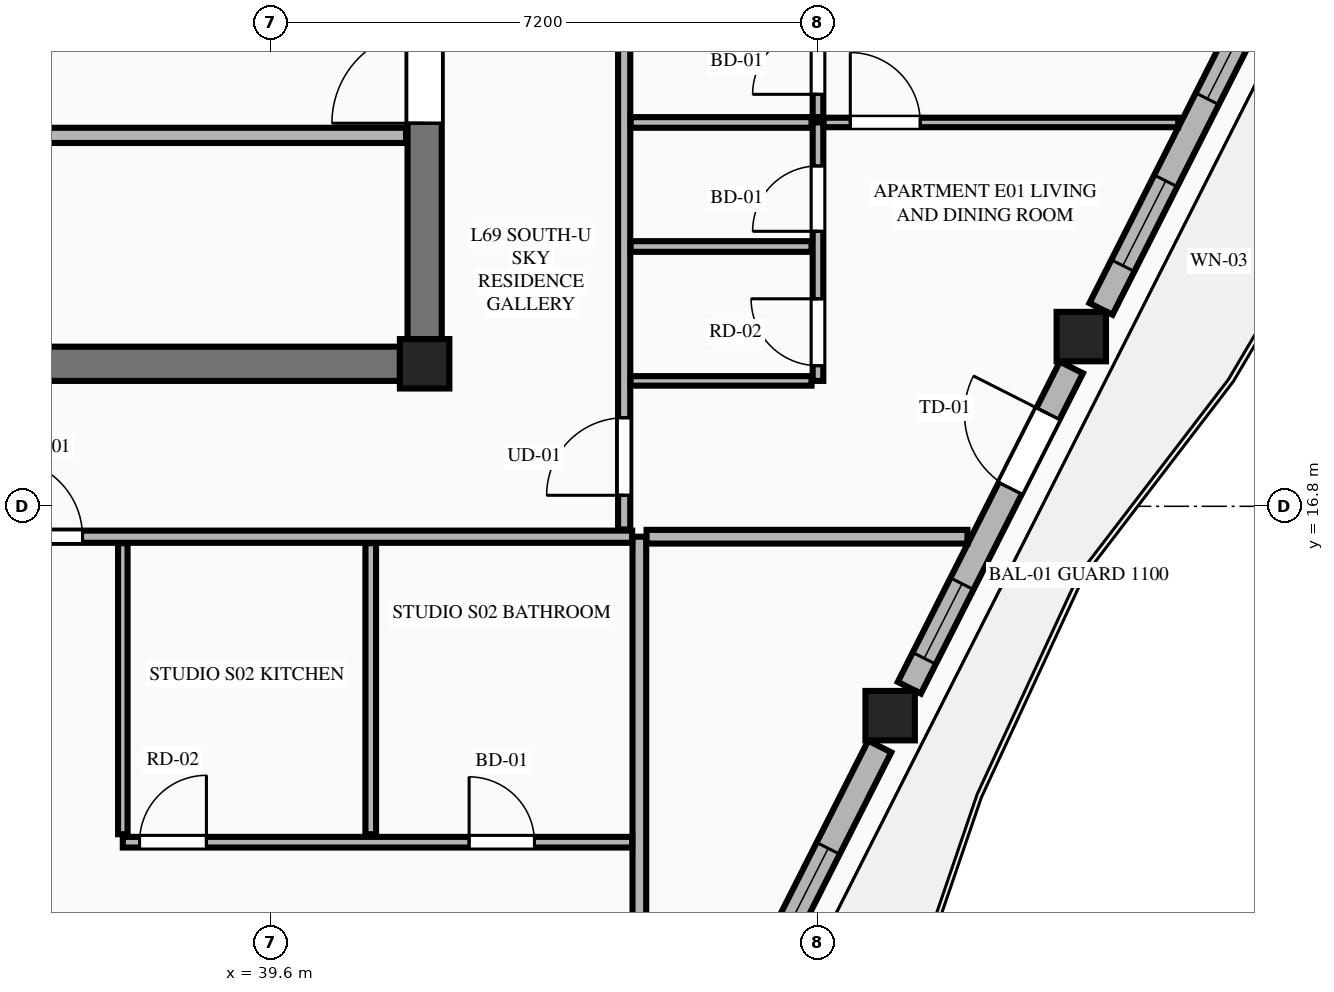
"""IFC4 building model, lengths in metres.
Left out: names, types, materials, properties, quantities, classifications, styles, units other than length and angle.
Written with IfcOpenShell. Run it as: python <this file> out.ifc"""

import sys

from ifc_helpers import new_model, si_unit, direction, frame, frame_2d, origin, origin_2d, place, context, subcontext, project, spatial, rectangle, extrude, element, fill, save


model = new_model("IFC4")
c1 = context("Model", 3, precision=1e-05, world=origin(), true_north=direction((0.0, 1.0)))
c2 = subcontext(c1, "Body", "Model", "MODEL_VIEW")
j1 = project(units=[si_unit("LENGTHUNIT", "METRE"), si_unit("PLANEANGLEUNIT", "RADIAN")], contexts=[c1])
p1 = place(None, origin())
s1 = spatial("IfcSite", under=j1, at=p1, CompositionType="ELEMENT")
p2 = place(p1, origin())
s2 = spatial("IfcBuilding", under=s1, at=p2, CompositionType="ELEMENT")
p3 = place(p2, frame((0.0, 0.0, 259.85)))
s3 = spatial("IfcBuildingStorey", under=s2, at=p3, CompositionType="ELEMENT", Elevation=259.85)
p4 = place(p3, frame((41.625, 18.675, 0.0), z_axis=(0.0, 0.0, 1.0), x_axis=(1.0, 0.0, 0.0)))
e1 = element("IfcColumn", 1, at=p4, inside=s3, PredefinedType="COLUMN", context=c2, shape_type="SweptSolid", body=[
    extrude(rectangle(XDim=0.65, YDim=0.65, at=origin_2d()), origin(), (0.0, 0.0, 1.0), 3.65),
])
p5 = place(p3, frame((23.5, 18.675, 0.0), z_axis=(0.0, 0.0, 1.0), x_axis=(1.0, 0.0, 0.0)))
e2 = element("IfcWall", 2, at=p5, inside=s3, PredefinedType="SHEAR", context=c2, shape_type="SweptSolid", body=[
    extrude(rectangle(XDim=17.8, YDim=0.45, at=frame_2d((8.9, 0.0))), origin(), (0.0, 0.0, 1.0), 3.45),
])
p6 = place(p3, frame((41.625, 19.0, 0.0), z_axis=(0.0, 0.0, 1.0), x_axis=(0.0, 1.0, 0.0)))
e3 = element("IfcWall", 3, at=p6, inside=s3, PredefinedType="SHEAR", context=c2, shape_type="SweptSolid", body=[
    extrude(rectangle(XDim=13.8, YDim=0.45, at=frame_2d((6.9, 0.0))), origin(), (0.0, 0.0, 1.0), 3.45),
])
p7 = place(p6, frame((2.84, 0.0, 0.0)))
e4 = element("IfcOpeningElement", 4, at=p7, cuts=e3, PredefinedType="OPENING", context=c2, shape_type="SweptSolid", body=[
    extrude(rectangle(XDim=1.22, YDim=2.25, at=frame_2d((0.61, 1.125))), frame((0.0, 0.235, 0.0), z_axis=(0.0, -1.0, 0.0), x_axis=(1.0, 0.0, 0.0)), (0.0, 0.0, 1.0), 0.47),
])
for number, where, z_axis, x_axis in (
    (5, (47.749, 14.046, 0.0), (0.0, 0.0, 1.0), (1.0, 0.0, 0.0)),
    (6, (50.264, 19.033, 0.0), (0.0, 0.0, 1.0), (1.0, 0.0, 0.0)),
):
    element("IfcColumn", number, at=place(p3, frame(where, z_axis=z_axis, x_axis=x_axis)), inside=s3, PredefinedType="COLUMN", context=c2, shape_type="SweptSolid", body=[
        extrude(rectangle(XDim=0.65, YDim=0.65, at=origin_2d()), origin(), (0.0, 0.0, 1.0), 3.65),
    ])
p8 = place(p3, frame((23.42, 21.68, 0.0), z_axis=(0.0, 0.0, 1.0), x_axis=(1.0, 0.0, 0.0)))
e7 = element("IfcWall", 7, at=p8, inside=s3, PredefinedType="PLUMBINGWALL", context=c2, shape_type="SweptSolid", body=[
    extrude(rectangle(XDim=17.96, YDim=0.2, at=frame_2d((8.98, 0.0))), origin(), (0.0, 0.0, 1.0), 3.45),
])
p9 = place(p8, frame((0.46, 0.0, 0.0)))
e8 = element("IfcOpeningElement", 8, at=p9, cuts=e7, PredefinedType="OPENING", context=c2, shape_type="SweptSolid", body=[
    extrude(rectangle(XDim=0.92, YDim=2.15, at=frame_2d((0.46, 1.075))), frame((0.0, 0.11, 0.0), z_axis=(0.0, -1.0, 0.0), x_axis=(1.0, 0.0, 0.0)), (0.0, 0.0, 1.0), 0.22),
])
p10 = place(p8, frame((9.48, 0.0, 0.0)))
e9 = element("IfcOpeningElement", 9, at=p10, cuts=e7, PredefinedType="OPENING", context=c2, shape_type="SweptSolid", body=[
    extrude(rectangle(XDim=0.92, YDim=2.15, at=frame_2d((0.46, 1.075))), frame((0.0, 0.11, 0.0), z_axis=(0.0, -1.0, 0.0), x_axis=(1.0, 0.0, 0.0)), (0.0, 0.0, 1.0), 0.22),
])
p11 = place(p3, frame((45.556, 9.577, 0.0), z_axis=(0.0, 0.0, 1.0), x_axis=(0.45154039276, 0.892250678737, 0.0)))
e10 = element("IfcWall", 10, at=p11, inside=s3, PredefinedType="STANDARD", context=c2, shape_type="SweptSolid", body=[
    extrude(rectangle(XDim=4.554, YDim=0.34, at=frame_2d((2.277, 0.0))), origin(), (0.0, 0.0, 1.0), 2.983),
])
p12 = place(p11, frame((1.502, 0.0, 0.75)))
e11 = element("IfcOpeningElement", 11, at=p12, cuts=e10, PredefinedType="OPENING", context=c2, shape_type="SweptSolid", body=[
    extrude(rectangle(XDim=1.55, YDim=2.05, at=frame_2d((0.775, 1.025))), frame((0.0, 0.18, 0.0), z_axis=(0.0, -1.0, 0.0), x_axis=(1.0, 0.0, 0.0)), (0.0, 0.0, 1.0), 0.36),
])
p13 = place(p3, frame((48.002, 14.413, 0.0), z_axis=(0.0, 0.0, 1.0), x_axis=(0.451468341582, 0.892287137949, 0.0)))
e12 = element("IfcWall", 12, at=p13, inside=s3, PredefinedType="STANDARD", context=c2, shape_type="SweptSolid", body=[
    extrude(rectangle(XDim=4.723, YDim=0.34, at=frame_2d((2.361, 0.0))), origin(), (0.0, 0.0, 1.0), 2.983),
])
p14 = place(p13, frame((2.941, 0.0, 0.0)))
e13 = element("IfcOpeningElement", 13, at=p14, cuts=e12, PredefinedType="OPENING", context=c2, shape_type="SweptSolid", body=[
    extrude(rectangle(XDim=1.1, YDim=2.25, at=frame_2d((0.55, 1.125))), frame((0.0, 0.18, 0.0), z_axis=(0.0, -1.0, 0.0), x_axis=(1.0, 0.0, 0.0)), (0.0, 0.0, 1.0), 0.36),
])
p15 = place(p13, frame((0.434, 0.0, 0.75)))
e14 = element("IfcOpeningElement", 14, at=p15, cuts=e12, PredefinedType="OPENING", context=c2, shape_type="SweptSolid", body=[
    extrude(rectangle(XDim=1.1, YDim=2.0, at=frame_2d((0.55, 1.0))), frame((0.0, 0.18, 0.0), z_axis=(0.0, -1.0, 0.0), x_axis=(1.0, 0.0, 0.0)), (0.0, 0.0, 1.0), 0.36),
])
p16 = place(p3, frame((50.523, 19.397, 0.0), z_axis=(0.0, 0.0, 1.0), x_axis=(0.45147697324, 0.892282770558, 0.0)))
e15 = element("IfcWall", 15, at=p16, inside=s3, PredefinedType="STANDARD", context=c2, shape_type="SweptSolid", body=[
    extrude(rectangle(XDim=4.53, YDim=0.34, at=frame_2d((2.265, 0.0))), origin(), (0.0, 0.0, 1.0), 2.983),
])
p17 = place(p16, frame((0.638, 0.0, 0.75)))
e16 = element("IfcOpeningElement", 16, at=p17, cuts=e15, PredefinedType="OPENING", context=c2, shape_type="SweptSolid", body=[
    extrude(rectangle(XDim=1.25, YDim=1.95, at=frame_2d((0.625, 0.975))), frame((0.0, 0.18, 0.0), z_axis=(0.0, -1.0, 0.0), x_axis=(1.0, 0.0, 0.0)), (0.0, 0.0, 1.0), 0.36),
])
p18 = place(p16, frame((3.098, 0.0, 0.75)))
e17 = element("IfcOpeningElement", 17, at=p18, cuts=e15, PredefinedType="OPENING", context=c2, shape_type="SweptSolid", body=[
    extrude(rectangle(XDim=1.1, YDim=2.0, at=frame_2d((0.55, 1.0))), frame((0.0, 0.18, 0.0), z_axis=(0.0, -1.0, 0.0), x_axis=(1.0, 0.0, 0.0)), (0.0, 0.0, 1.0), 0.36),
])
p19 = place(p3, frame((44.45, 8.119, 0.0), z_axis=(0.0, 0.0, 1.0), x_axis=(0.0, 1.0, 0.0)))
e18 = element("IfcWall", 18, at=p19, inside=s3, PredefinedType="PARTITIONING", context=c2, shape_type="SweptSolid", body=[
    extrude(rectangle(XDim=8.281, YDim=0.18, at=frame_2d((4.141, 0.0))), origin(), (0.0, 0.0, 1.0), 3.45),
])
p20 = place(p3, frame((35.749, 16.4, 0.0), z_axis=(0.0, 0.0, 1.0), x_axis=(1.0, 0.0, 0.0)))
e19 = element("IfcWall", 19, at=p20, inside=s3, PredefinedType="PARTITIONING", context=c2, shape_type="SweptSolid", body=[
    extrude(rectangle(XDim=8.606, YDim=0.16, at=frame_2d((4.303, 0.0))), origin(), (0.0, 0.0, 1.0), 3.45),
])
p21 = place(p20, frame((0.355, 0.0, 0.0)))
e20 = element("IfcOpeningElement", 20, at=p21, cuts=e19, PredefinedType="OPENING", context=c2, shape_type="SweptSolid", body=[
    extrude(rectangle(XDim=1.02, YDim=2.25, at=frame_2d((0.51, 1.125))), frame((0.0, 0.09, 0.0), z_axis=(0.0, -1.0, 0.0), x_axis=(1.0, 0.0, 0.0)), (0.0, 0.0, 1.0), 0.18),
])
p22 = place(p3, frame((37.654, 12.486, 0.0), z_axis=(0.0, 0.0, 1.0), x_axis=(0.0, 1.0, 0.0)))
e21 = element("IfcWall", 21, at=p22, inside=s3, PredefinedType="PARTITIONING", context=c2, shape_type="SweptSolid", body=[
    extrude(rectangle(XDim=3.829, YDim=0.125, at=frame_2d((1.915, 0.0))), origin(), (0.0, 0.0, 1.0), 3.45),
])
p23 = place(p3, frame((37.654, 12.381, 0.0), z_axis=(0.0, 0.0, 1.0), x_axis=(1.0, 0.0, 0.0)))
e22 = element("IfcWall", 22, at=p23, inside=s3, PredefinedType="PLUMBINGWALL", context=c2, shape_type="SweptSolid", body=[
    extrude(rectangle(XDim=6.701, YDim=0.14, at=frame_2d((3.351, 0.0))), origin(), (0.0, 0.0, 1.0), 3.45),
])
p24 = place(p23, frame((4.556, 0.0, 0.0)))
e23 = element("IfcOpeningElement", 23, at=p24, cuts=e22, PredefinedType="OPENING", context=c2, shape_type="SweptSolid", body=[
    extrude(rectangle(XDim=0.86, YDim=2.1, at=frame_2d((0.43, 1.05))), frame((0.0, 0.08, 0.0), z_axis=(0.0, -1.0, 0.0), x_axis=(1.0, 0.0, 0.0)), (0.0, 0.0, 1.0), 0.16),
])
p25 = place(p23, frame((0.22, 0.0, 0.0)))
e24 = element("IfcOpeningElement", 24, at=p25, cuts=e22, PredefinedType="OPENING", context=c2, shape_type="SweptSolid", body=[
    extrude(rectangle(XDim=0.88, YDim=2.15, at=frame_2d((0.44, 1.075))), frame((0.0, 0.08, 0.0), z_axis=(0.0, -1.0, 0.0), x_axis=(1.0, 0.0, 0.0)), (0.0, 0.0, 1.0), 0.16),
])
p26 = place(p3, frame((40.916, 12.486, 0.0), z_axis=(0.0, 0.0, 1.0), x_axis=(0.0, 1.0, 0.0)))
e25 = element("IfcWall", 25, at=p26, inside=s3, PredefinedType="PLUMBINGWALL", context=c2, shape_type="SweptSolid", body=[
    extrude(rectangle(XDim=3.829, YDim=0.14, at=frame_2d((1.915, 0.0))), origin(), (0.0, 0.0, 1.0), 3.45),
])
p27 = place(p3, frame((44.545, 16.4, 0.0), z_axis=(0.0, 0.0, 1.0), x_axis=(1.0, 0.0, 0.0)))
e26 = element("IfcWall", 26, at=p27, inside=s3, PredefinedType="PARTITIONING", context=c2, shape_type="SweptSolid", body=[
    extrude(rectangle(XDim=4.221, YDim=0.18, at=frame_2d((2.111, 0.0))), origin(), (0.0, 0.0, 1.0), 3.45),
])
p28 = place(p3, frame((44.25, 16.495, 0.0), z_axis=(0.0, 0.0, 1.0), x_axis=(0.0, 1.0, 0.0)))
e27 = element("IfcWall", 27, at=p28, inside=s3, PredefinedType="PARTITIONING", context=c2, shape_type="SweptSolid", body=[
    extrude(rectangle(XDim=9.854, YDim=0.16, at=frame_2d((4.927, 0.0))), origin(), (0.0, 0.0, 1.0), 3.137),
])
p29 = place(p28, frame((0.45, 0.0, 0.0)))
e28 = element("IfcOpeningElement", 28, at=p29, cuts=e27, PredefinedType="OPENING", context=c2, shape_type="SweptSolid", body=[
    extrude(rectangle(XDim=1.02, YDim=2.25, at=frame_2d((0.51, 1.125))), frame((0.0, 0.09, 0.0), z_axis=(0.0, -1.0, 0.0), x_axis=(1.0, 0.0, 0.0)), (0.0, 0.0, 1.0), 0.18),
])
p30 = place(p3, frame((44.335, 18.45, 0.0), z_axis=(0.0, 0.0, 1.0), x_axis=(1.0, 0.0, 0.0)))
e29 = element("IfcWall", 29, at=p30, inside=s3, PredefinedType="PARTITIONING", context=c2, shape_type="SweptSolid", body=[
    extrude(rectangle(XDim=2.38, YDim=0.125, at=frame_2d((1.19, 0.0))), origin(), (0.0, 0.0, 1.0), 3.45),
])
p31 = place(p3, frame((46.8, 18.45, 0.0), z_axis=(0.0, 0.0, 1.0), x_axis=(0.0, 1.0, 0.0)))
e30 = element("IfcWall", 30, at=p31, inside=s3, PredefinedType="PLUMBINGWALL", context=c2, shape_type="SweptSolid", body=[
    extrude(rectangle(XDim=3.4, YDim=0.14, at=frame_2d((1.7, 0.0))), origin(), (0.0, 0.0, 1.0), 3.45),
])
p32 = place(p31, frame((0.2, 0.0, 0.0)))
e31 = element("IfcOpeningElement", 31, at=p32, cuts=e30, PredefinedType="OPENING", context=c2, shape_type="SweptSolid", body=[
    extrude(rectangle(XDim=0.88, YDim=2.15, at=frame_2d((0.44, 1.075))), frame((0.0, 0.08, 0.0), z_axis=(0.0, -1.0, 0.0), x_axis=(1.0, 0.0, 0.0)), (0.0, 0.0, 1.0), 0.16),
])
p33 = place(p31, frame((1.968, 0.0, 0.0)))
e32 = element("IfcOpeningElement", 32, at=p33, cuts=e30, PredefinedType="OPENING", context=c2, shape_type="SweptSolid", body=[
    extrude(rectangle(XDim=0.86, YDim=2.1, at=frame_2d((0.43, 1.05))), frame((0.0, 0.08, 0.0), z_axis=(0.0, -1.0, 0.0), x_axis=(1.0, 0.0, 0.0)), (0.0, 0.0, 1.0), 0.16),
])
p34 = place(p3, frame((46.8, 21.92, 0.0), z_axis=(0.0, 0.0, 1.0), x_axis=(0.0, 1.0, 0.0)))
e33 = element("IfcWall", 33, at=p34, inside=s3, PredefinedType="PLUMBINGWALL", context=c2, shape_type="SweptSolid", body=[
    extrude(rectangle(XDim=4.429, YDim=0.14, at=frame_2d((2.215, 0.0))), origin(), (0.0, 0.0, 1.0), 3.45),
])
p35 = place(p34, frame((0.3, 0.0, 0.0)))
e34 = element("IfcOpeningElement", 34, at=p35, cuts=e33, PredefinedType="OPENING", context=c2, shape_type="SweptSolid", body=[
    extrude(rectangle(XDim=0.86, YDim=2.1, at=frame_2d((0.43, 1.05))), frame((0.0, 0.08, 0.0), z_axis=(0.0, -1.0, 0.0), x_axis=(1.0, 0.0, 0.0)), (0.0, 0.0, 1.0), 0.16),
])
p36 = place(p3, frame((44.335, 21.85, 0.0), z_axis=(0.0, 0.0, 1.0), x_axis=(1.0, 0.0, 0.0)))
e35 = element("IfcWall", 35, at=p36, inside=s3, PredefinedType="PLUMBINGWALL", context=c2, shape_type="SweptSolid", body=[
    extrude(rectangle(XDim=2.38, YDim=0.14, at=frame_2d((1.19, 0.0))), origin(), (0.0, 0.0, 1.0), 3.45),
])
p37 = place(p3, frame((46.875, 21.85, 0.0), z_axis=(0.0, 0.0, 1.0), x_axis=(1.0, 0.0, 0.0)))
e36 = element("IfcWall", 36, at=p37, inside=s3, PredefinedType="PARTITIONING", context=c2, shape_type="SweptSolid", body=[
    extrude(rectangle(XDim=4.663, YDim=0.125, at=frame_2d((2.332, 0.0))), origin(), (0.0, 0.0, 1.0), 3.45),
])
p38 = place(p37, frame((0.35, 0.0, 0.0)))
e37 = element("IfcOpeningElement", 37, at=p38, cuts=e36, PredefinedType="OPENING", context=c2, shape_type="SweptSolid", body=[
    extrude(rectangle(XDim=0.92, YDim=2.15, at=frame_2d((0.46, 1.075))), frame((0.0, 0.073, 0.0), z_axis=(0.0, -1.0, 0.0), x_axis=(1.0, 0.0, 0.0)), (0.0, 0.0, 1.0), 0.145),
])
p39 = place(p3, frame((44.335, 20.218, 0.0), z_axis=(0.0, 0.0, 1.0), x_axis=(1.0, 0.0, 0.0)))
e38 = element("IfcWall", 38, at=p39, inside=s3, PredefinedType="PLUMBINGWALL", context=c2, shape_type="SweptSolid", body=[
    extrude(rectangle(XDim=2.38, YDim=0.14, at=frame_2d((1.19, 0.0))), origin(), (0.0, 0.0, 1.0), 3.45),
])
p40 = place(p7, origin())
e39 = element("IfcDoor", 39, at=p40, inside=s3, OperationType="SINGLE_SWING_LEFT", PredefinedType="DOOR", context=c2, shape_type="SweptSolid", body=[
    extrude(rectangle(XDim=1.22, YDim=2.25, at=frame_2d((0.61, 1.125))), frame((0.0, 0.025, 0.0), z_axis=(0.0, -1.0, 0.0), x_axis=(1.0, 0.0, 0.0)), (0.0, 0.0, 1.0), 0.05),
])
fill(e4, e39)
p41 = place(p12, origin())
e40 = element("IfcWindow", 40, at=p41, inside=s3, PartitioningType="SINGLE_PANEL", PredefinedType="WINDOW", context=c2, shape_type="SweptSolid", body=[
    extrude(rectangle(XDim=1.55, YDim=2.05, at=frame_2d((0.775, 1.025))), frame((0.0, 0.03, 0.0), z_axis=(0.0, -1.0, 0.0), x_axis=(1.0, 0.0, 0.0)), (0.0, 0.0, 1.0), 0.06),
])
fill(e11, e40)
p42 = place(p14, origin())
e41 = element("IfcDoor", 41, at=p42, inside=s3, OperationType="SINGLE_SWING_RIGHT", PredefinedType="DOOR", context=c2, shape_type="SweptSolid", body=[
    extrude(rectangle(XDim=1.1, YDim=2.25, at=frame_2d((0.55, 1.125))), frame((0.0, 0.025, 0.0), z_axis=(0.0, -1.0, 0.0), x_axis=(1.0, 0.0, 0.0)), (0.0, 0.0, 1.0), 0.05),
])
fill(e13, e41)
p43 = place(p17, origin())
e42 = element("IfcWindow", 42, at=p43, inside=s3, PartitioningType="SINGLE_PANEL", PredefinedType="WINDOW", context=c2, shape_type="SweptSolid", body=[
    extrude(rectangle(XDim=1.25, YDim=1.95, at=frame_2d((0.625, 0.975))), frame((0.0, 0.03, 0.0), z_axis=(0.0, -1.0, 0.0), x_axis=(1.0, 0.0, 0.0)), (0.0, 0.0, 1.0), 0.06),
])
fill(e16, e42)
p44 = place(p24, origin())
e43 = element("IfcDoor", 43, at=p44, inside=s3, OperationType="SINGLE_SWING_LEFT", PredefinedType="DOOR", context=c2, shape_type="SweptSolid", body=[
    extrude(rectangle(XDim=0.86, YDim=2.1, at=frame_2d((0.43, 1.05))), frame((0.0, 0.025, 0.0), z_axis=(0.0, -1.0, 0.0), x_axis=(1.0, 0.0, 0.0)), (0.0, 0.0, 1.0), 0.05),
])
fill(e23, e43)
p45 = place(p21, origin())
e44 = element("IfcDoor", 44, at=p45, inside=s3, OperationType="SINGLE_SWING_LEFT", PredefinedType="DOOR", context=c2, shape_type="SweptSolid", body=[
    extrude(rectangle(XDim=1.02, YDim=2.25, at=frame_2d((0.51, 1.125))), frame((0.0, 0.025, 0.0), z_axis=(0.0, -1.0, 0.0), x_axis=(1.0, 0.0, 0.0)), (0.0, 0.0, 1.0), 0.05),
])
fill(e20, e44)
p46 = place(p25, origin())
e45 = element("IfcDoor", 45, at=p46, inside=s3, OperationType="SINGLE_SWING_RIGHT", PredefinedType="DOOR", context=c2, shape_type="SweptSolid", body=[
    extrude(rectangle(XDim=0.88, YDim=2.15, at=frame_2d((0.44, 1.075))), frame((0.0, 0.025, 0.0), z_axis=(0.0, -1.0, 0.0), x_axis=(1.0, 0.0, 0.0)), (0.0, 0.0, 1.0), 0.05),
])
fill(e24, e45)
p47 = place(p32, origin())
e46 = element("IfcDoor", 46, at=p47, inside=s3, OperationType="SINGLE_SWING_RIGHT", PredefinedType="DOOR", context=c2, shape_type="SweptSolid", body=[
    extrude(rectangle(XDim=0.88, YDim=2.15, at=frame_2d((0.44, 1.075))), frame((0.0, 0.025, 0.0), z_axis=(0.0, -1.0, 0.0), x_axis=(1.0, 0.0, 0.0)), (0.0, 0.0, 1.0), 0.05),
])
fill(e31, e46)
p48 = place(p33, origin())
e47 = element("IfcDoor", 47, at=p48, inside=s3, OperationType="SINGLE_SWING_LEFT", PredefinedType="DOOR", context=c2, shape_type="SweptSolid", body=[
    extrude(rectangle(XDim=0.86, YDim=2.1, at=frame_2d((0.43, 1.05))), frame((0.0, 0.025, 0.0), z_axis=(0.0, -1.0, 0.0), x_axis=(1.0, 0.0, 0.0)), (0.0, 0.0, 1.0), 0.05),
])
fill(e32, e47)
p49 = place(p35, origin())
e48 = element("IfcDoor", 48, at=p49, inside=s3, OperationType="SINGLE_SWING_LEFT", PredefinedType="DOOR", context=c2, shape_type="SweptSolid", body=[
    extrude(rectangle(XDim=0.86, YDim=2.1, at=frame_2d((0.43, 1.05))), frame((0.0, 0.025, 0.0), z_axis=(0.0, -1.0, 0.0), x_axis=(1.0, 0.0, 0.0)), (0.0, 0.0, 1.0), 0.05),
])
fill(e34, e48)
p50 = place(p29, origin())
e49 = element("IfcDoor", 49, at=p50, inside=s3, OperationType="SINGLE_SWING_LEFT", PredefinedType="DOOR", context=c2, shape_type="SweptSolid", body=[
    extrude(rectangle(XDim=1.02, YDim=2.25, at=frame_2d((0.51, 1.125))), frame((0.0, 0.025, 0.0), z_axis=(0.0, -1.0, 0.0), x_axis=(1.0, 0.0, 0.0)), (0.0, 0.0, 1.0), 0.05),
])
fill(e28, e49)
p51 = place(p38, origin())
e50 = element("IfcDoor", 50, at=p51, inside=s3, OperationType="SINGLE_SWING_LEFT", PredefinedType="DOOR", context=c2, shape_type="SweptSolid", body=[
    extrude(rectangle(XDim=0.92, YDim=2.15, at=frame_2d((0.46, 1.075))), frame((0.0, 0.025, 0.0), z_axis=(0.0, -1.0, 0.0), x_axis=(1.0, 0.0, 0.0)), (0.0, 0.0, 1.0), 0.05),
])
fill(e37, e50)
p52 = place(p15, origin())
e51 = element("IfcWindow", 51, at=p52, inside=s3, PartitioningType="SINGLE_PANEL", PredefinedType="WINDOW", context=c2, shape_type="SweptSolid", body=[
    extrude(rectangle(XDim=1.1, YDim=2.0, at=frame_2d((0.55, 1.0))), frame((0.0, 0.03, 0.0), z_axis=(0.0, -1.0, 0.0), x_axis=(1.0, 0.0, 0.0)), (0.0, 0.0, 1.0), 0.06),
])
fill(e14, e51)
p53 = place(p18, origin())
e52 = element("IfcWindow", 52, at=p53, inside=s3, PartitioningType="SINGLE_PANEL", PredefinedType="WINDOW", context=c2, shape_type="SweptSolid", body=[
    extrude(rectangle(XDim=1.1, YDim=2.0, at=frame_2d((0.55, 1.0))), frame((0.0, 0.03, 0.0), z_axis=(0.0, -1.0, 0.0), x_axis=(1.0, 0.0, 0.0)), (0.0, 0.0, 1.0), 0.06),
])
fill(e17, e52)
save(model, sys.argv[1])
